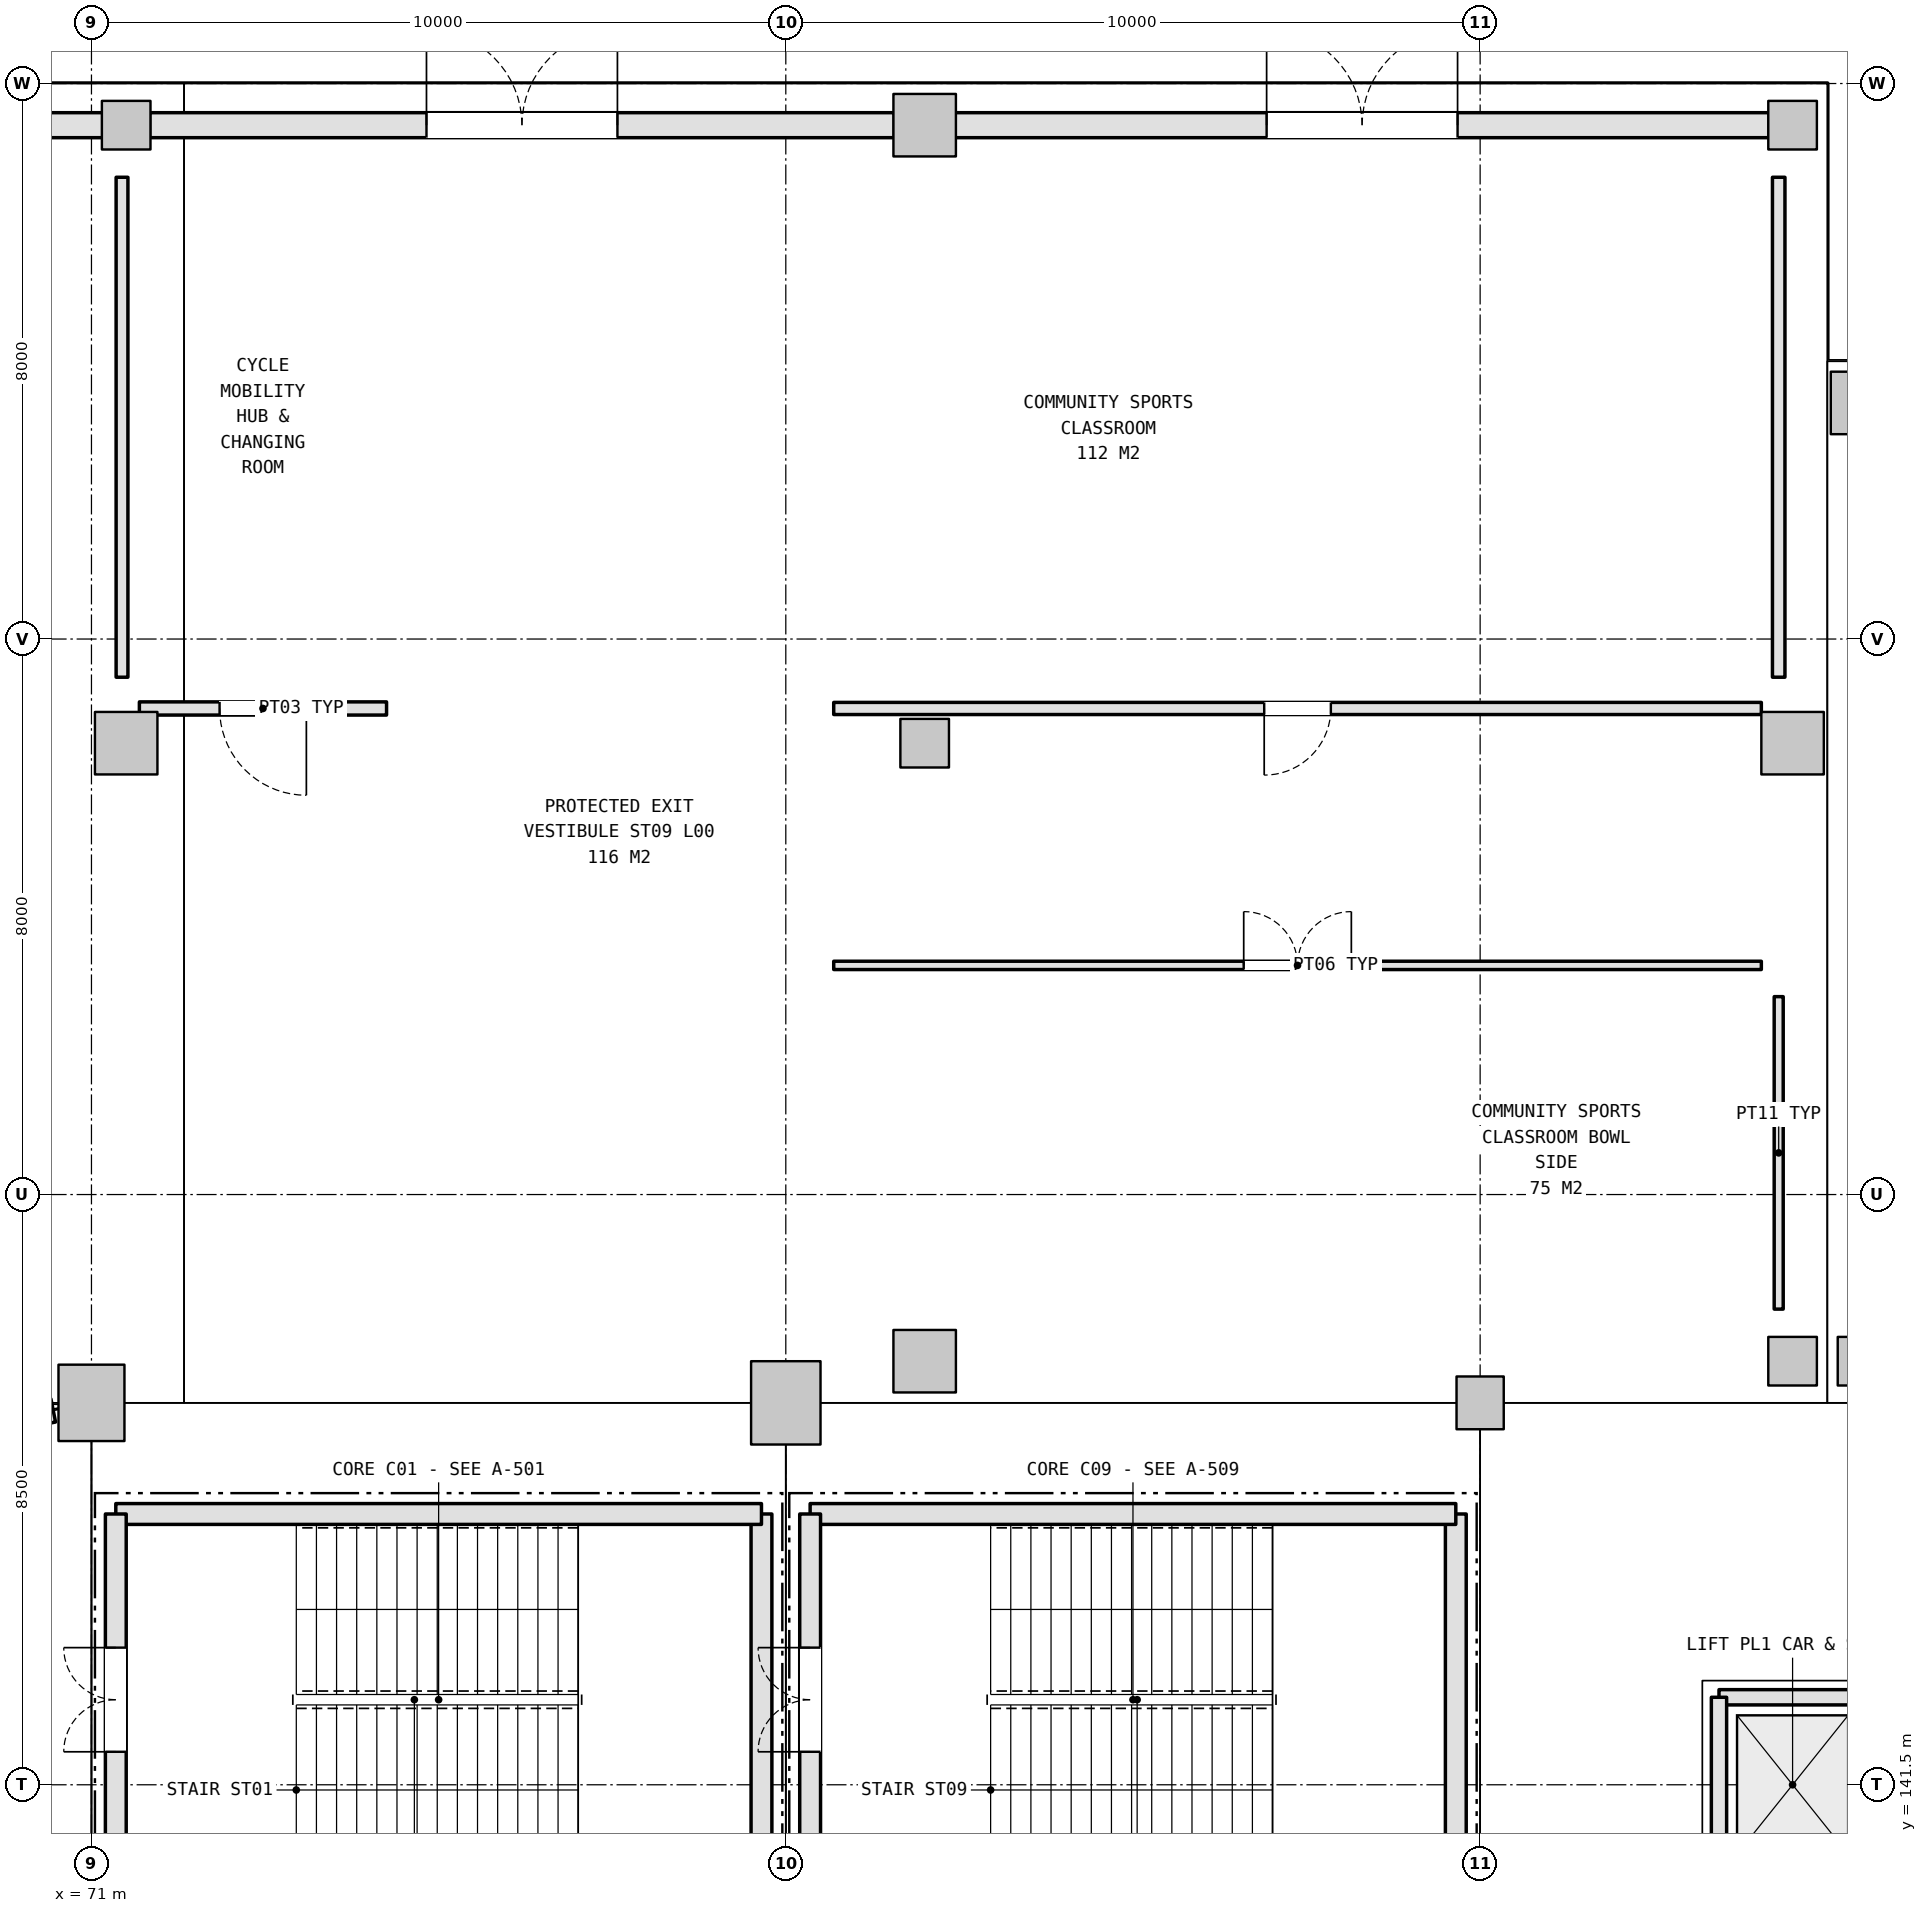
"""IFC4 building model, lengths in metres.
Left out: names, types, materials, properties, quantities, classifications, styles, units other than length and angle.
Written with IfcOpenShell. Run it as: python <this file> out.ifc"""

import sys

from ifc_helpers import new_model, si_unit, direction, frame, frame_2d, origin, origin_2d, place, context, subcontext, project, spatial, rectangle, extrude, element, fill, save


model = new_model("IFC4")
c1 = context("Model", 3, precision=1e-05, world=origin(), true_north=direction((0.0, 1.0)))
c2 = subcontext(c1, "Body", "Model", "MODEL_VIEW")
j1 = project(units=[si_unit("LENGTHUNIT", "METRE"), si_unit("PLANEANGLEUNIT", "RADIAN")], contexts=[c1])
p1 = place(None, origin())
s1 = spatial("IfcSite", under=j1, at=p1, CompositionType="ELEMENT")
p2 = place(p1, origin())
s2 = spatial("IfcBuilding", under=s1, at=p2, CompositionType="ELEMENT")
p3 = place(p2, origin())
s3 = spatial("IfcBuildingStorey", under=s2, at=p3, CompositionType="ELEMENT", Elevation=0.0)
p4 = place(p3, frame((91.0, 147.0, 0.0), z_axis=(0.0, 0.0, 1.0), x_axis=(1.0, 0.0, 0.0)))
e1 = element("IfcColumn", 1, at=p4, inside=s3, PredefinedType="COLUMN", context=c2, shape_type="SweptSolid", body=[
    extrude(rectangle(XDim=0.68, YDim=0.76, at=origin_2d()), origin(), (0.0, 0.0, 1.0), 5.4),
])
p5 = place(p3, frame((81.0, 147.0, 0.0), z_axis=(0.0, 0.0, 1.0), x_axis=(1.0, 0.0, 0.0)))
e2 = element("IfcColumn", 2, at=p5, inside=s3, PredefinedType="COLUMN", context=c2, shape_type="SweptSolid", body=[
    extrude(rectangle(XDim=1.0, YDim=1.2, at=origin_2d()), origin(), (0.0, 0.0, 1.0), 5.4),
])
p6 = place(p3, frame((71.0, 147.0, 0.0), z_axis=(0.0, 0.0, 1.0), x_axis=(1.0, 0.0, 0.0)))
e3 = element("IfcColumn", 3, at=p6, inside=s3, PredefinedType="COLUMN", context=c2, shape_type="SweptSolid", body=[
    extrude(rectangle(XDim=0.95, YDim=1.1, at=origin_2d()), origin(), (0.0, 0.0, 1.0), 5.4),
])
p7 = place(p3, frame((71.5, 156.5, 0.0), z_axis=(0.0, 0.0, 1.0), x_axis=(1.0, 0.0, 0.0)))
e4 = element("IfcColumn", 4, at=p7, inside=s3, PredefinedType="COLUMN", context=c2, shape_type="SweptSolid", body=[
    extrude(rectangle(XDim=0.9, YDim=0.9, at=origin_2d()), origin(), (0.0, 0.0, 1.0), 5.4),
])
p8 = place(p3, frame((71.5, 165.4, 0.0), z_axis=(0.0, 0.0, 1.0), x_axis=(1.0, 0.0, 0.0)))
e5 = element("IfcColumn", 5, at=p8, inside=s3, PredefinedType="COLUMN", context=c2, shape_type="SweptSolid", body=[
    extrude(rectangle(XDim=0.7, YDim=0.7, at=origin_2d()), origin(), (0.0, 0.0, 1.0), 5.4),
])
p9 = place(p3, frame((83.0, 147.6, 0.0), z_axis=(0.0, 0.0, 1.0), x_axis=(1.0, 0.0, 0.0)))
e6 = element("IfcColumn", 6, at=p9, inside=s3, PredefinedType="COLUMN", context=c2, shape_type="SweptSolid", body=[
    extrude(rectangle(XDim=0.9, YDim=0.9, at=origin_2d()), origin(), (0.0, 0.0, 1.0), 5.4),
])
p10 = place(p3, frame((83.0, 156.5, 0.0), z_axis=(0.0, 0.0, 1.0), x_axis=(1.0, 0.0, 0.0)))
e7 = element("IfcColumn", 7, at=p10, inside=s3, PredefinedType="COLUMN", context=c2, shape_type="SweptSolid", body=[
    extrude(rectangle(XDim=0.7, YDim=0.7, at=origin_2d()), origin(), (0.0, 0.0, 1.0), 5.4),
])
p11 = place(p3, frame((83.0, 165.4, 0.0), z_axis=(0.0, 0.0, 1.0), x_axis=(1.0, 0.0, 0.0)))
e8 = element("IfcColumn", 8, at=p11, inside=s3, PredefinedType="COLUMN", context=c2, shape_type="SweptSolid", body=[
    extrude(rectangle(XDim=0.9, YDim=0.9, at=origin_2d()), origin(), (0.0, 0.0, 1.0), 5.4),
])
p12 = place(p3, frame((95.5, 147.6, 0.0), z_axis=(0.0, 0.0, 1.0), x_axis=(1.0, 0.0, 0.0)))
e9 = element("IfcColumn", 9, at=p12, inside=s3, PredefinedType="COLUMN", context=c2, shape_type="SweptSolid", body=[
    extrude(rectangle(XDim=0.7, YDim=0.7, at=origin_2d()), origin(), (0.0, 0.0, 1.0), 5.4),
])
p13 = place(p3, frame((95.5, 156.5, 0.0), z_axis=(0.0, 0.0, 1.0), x_axis=(1.0, 0.0, 0.0)))
e10 = element("IfcColumn", 10, at=p13, inside=s3, PredefinedType="COLUMN", context=c2, shape_type="SweptSolid", body=[
    extrude(rectangle(XDim=0.9, YDim=0.9, at=origin_2d()), origin(), (0.0, 0.0, 1.0), 5.4),
])
for number, where, z_axis, x_axis in (
    (11, (95.5, 165.4, 0.0), (0.0, 0.0, 1.0), (1.0, 0.0, 0.0)),
    (12, (96.5, 147.6, 0.0), (0.0, 0.0, 1.0), (1.0, 0.0, 0.0)),
):
    element("IfcColumn", number, at=place(p3, frame(where, z_axis=z_axis, x_axis=x_axis)), inside=s3, PredefinedType="COLUMN", context=c2, shape_type="SweptSolid", body=[
        extrude(rectangle(XDim=0.7, YDim=0.7, at=origin_2d()), origin(), (0.0, 0.0, 1.0), 5.4),
    ])
p14 = place(p3, frame((96.5, 161.4, 0.0), z_axis=(0.0, 0.0, 1.0), x_axis=(1.0, 0.0, 0.0)))
e13 = element("IfcColumn", 13, at=p14, inside=s3, PredefinedType="COLUMN", context=c2, shape_type="SweptSolid", body=[
    extrude(rectangle(XDim=0.9, YDim=0.9, at=origin_2d()), origin(), (0.0, 0.0, 1.0), 5.4),
])
p15 = place(p3, frame((70.45, 146.89, 0.0), z_axis=(0.0, 0.0, 1.0), x_axis=(-0.980787488403, -0.195079221324, 0.0)))
e14 = element("IfcWall", 14, at=p15, inside=s3, PredefinedType="SOLIDWALL", context=c2, shape_type="SweptSolid", body=[
    extrude(rectangle(XDim=19.246, YDim=0.34, at=frame_2d((9.623, 0.0))), origin(), (0.0, 0.0, 1.0), 4.275),
])
p16 = place(p15, frame((8.823, 0.0, 2.4)))
e15 = element("IfcOpeningElement", 15, at=p16, cuts=e14, PredefinedType="OPENING", context=c2, shape_type="SweptSolid", body=[
    extrude(rectangle(XDim=1.6, YDim=1.2, at=frame_2d((0.8, 0.6))), frame((0.0, 0.18, 0.0), z_axis=(0.0, -1.0, 0.0), x_axis=(1.0, 0.0, 0.0)), (0.0, 0.0, 1.0), 0.36),
])
p17 = place(p3, frame((60.438, 165.4, 0.0), z_axis=(0.0, 0.0, 1.0), x_axis=(1.0, 0.0, 0.0)))
e16 = element("IfcWall", 16, at=p17, inside=s3, PredefinedType="SOLIDWALL", context=c2, shape_type="SweptSolid", body=[
    extrude(rectangle(XDim=10.724, YDim=0.36, at=frame_2d((5.362, 0.0))), origin(), (0.0, 0.0, 1.0), 4.475),
])
p18 = place(p17, frame((3.987, 0.0, 0.0)))
e17 = element("IfcOpeningElement", 17, at=p18, cuts=e16, PredefinedType="OPENING", context=c2, shape_type="SweptSolid", body=[
    extrude(rectangle(XDim=2.75, YDim=2.4, at=frame_2d((1.375, 1.2))), frame((0.0, 0.19, 0.0), z_axis=(0.0, -1.0, 0.0), x_axis=(1.0, 0.0, 0.0)), (0.0, 0.0, 1.0), 0.38),
])
p19 = place(p3, frame((71.838, 165.4, 0.0), z_axis=(0.0, 0.0, 1.0), x_axis=(1.0, 0.0, 0.0)))
e18 = element("IfcWall", 18, at=p19, inside=s3, PredefinedType="SOLIDWALL", context=c2, shape_type="SweptSolid", body=[
    extrude(rectangle(XDim=10.724, YDim=0.36, at=frame_2d((5.362, 0.0))), origin(), (0.0, 0.0, 1.0), 4.475),
])
p20 = place(p19, frame((3.987, 0.0, 0.0)))
e19 = element("IfcOpeningElement", 19, at=p20, cuts=e18, PredefinedType="OPENING", context=c2, shape_type="SweptSolid", body=[
    extrude(rectangle(XDim=2.75, YDim=2.4, at=frame_2d((1.375, 1.2))), frame((0.0, 0.19, 0.0), z_axis=(0.0, -1.0, 0.0), x_axis=(1.0, 0.0, 0.0)), (0.0, 0.0, 1.0), 0.38),
])
p21 = place(p3, frame((83.438, 165.4, 0.0), z_axis=(0.0, 0.0, 1.0), x_axis=(1.0, 0.0, 0.0)))
e20 = element("IfcWall", 20, at=p21, inside=s3, PredefinedType="SOLIDWALL", context=c2, shape_type="SweptSolid", body=[
    extrude(rectangle(XDim=11.724, YDim=0.36, at=frame_2d((5.862, 0.0))), origin(), (0.0, 0.0, 1.0), 4.475),
])
p22 = place(p21, frame((4.487, 0.0, 0.0)))
e21 = element("IfcOpeningElement", 21, at=p22, cuts=e20, PredefinedType="OPENING", context=c2, shape_type="SweptSolid", body=[
    extrude(rectangle(XDim=2.75, YDim=2.4, at=frame_2d((1.375, 1.2))), frame((0.0, 0.19, 0.0), z_axis=(0.0, -1.0, 0.0), x_axis=(1.0, 0.0, 0.0)), (0.0, 0.0, 1.0), 0.38),
])
p23 = place(p3, frame((80.65, 140.05, 0.0), z_axis=(0.0, 0.0, 1.0), x_axis=(0.0, 1.0, 0.0)))
e22 = element("IfcWall", 22, at=p23, inside=s3, PredefinedType="SHEAR", context=c2, shape_type="SweptSolid", body=[
    extrude(rectangle(XDim=5.349, YDim=0.3, at=frame_2d((2.675, 0.0))), origin(), (0.0, 0.0, 1.0), 5.14),
])
p24 = place(p3, frame((80.65, 145.4, 0.0), z_axis=(0.0, 0.0, 1.0), x_axis=(-1.0, 0.0, 0.0)))
e23 = element("IfcWall", 23, at=p24, inside=s3, PredefinedType="SHEAR", context=c2, shape_type="SweptSolid", body=[
    extrude(rectangle(XDim=9.299, YDim=0.3, at=frame_2d((4.65, 0.0))), origin(), (0.0, 0.0, 1.0), 5.14),
])
p25 = place(p3, frame((71.35, 145.4, 0.0), z_axis=(0.0, 0.0, 1.0), x_axis=(0.0, -1.0, 0.0)))
e24 = element("IfcWall", 24, at=p25, inside=s3, PredefinedType="SHEAR", context=c2, shape_type="SweptSolid", body=[
    extrude(rectangle(XDim=5.349, YDim=0.3, at=frame_2d((2.675, 0.0))), origin(), (0.0, 0.0, 1.0), 5.14),
])
p26 = place(p25, frame((1.925, 0.0, 0.0)))
e25 = element("IfcOpeningElement", 25, at=p26, cuts=e24, PredefinedType="OPENING", context=c2, shape_type="SweptSolid", body=[
    extrude(rectangle(XDim=1.5, YDim=2.2, at=frame_2d((0.75, 1.1))), frame((0.0, 0.16, 0.0), z_axis=(0.0, -1.0, 0.0), x_axis=(1.0, 0.0, 0.0)), (0.0, 0.0, 1.0), 0.32),
])
p27 = place(p3, frame((90.65, 140.05, 0.0), z_axis=(0.0, 0.0, 1.0), x_axis=(0.0, 1.0, 0.0)))
e26 = element("IfcWall", 26, at=p27, inside=s3, PredefinedType="SHEAR", context=c2, shape_type="SweptSolid", body=[
    extrude(rectangle(XDim=5.349, YDim=0.3, at=frame_2d((2.675, 0.0))), origin(), (0.0, 0.0, 1.0), 5.14),
])
p28 = place(p3, frame((90.65, 145.4, 0.0), z_axis=(0.0, 0.0, 1.0), x_axis=(-1.0, 0.0, 0.0)))
e27 = element("IfcWall", 27, at=p28, inside=s3, PredefinedType="SHEAR", context=c2, shape_type="SweptSolid", body=[
    extrude(rectangle(XDim=9.299, YDim=0.3, at=frame_2d((4.65, 0.0))), origin(), (0.0, 0.0, 1.0), 5.14),
])
p29 = place(p3, frame((81.35, 145.4, 0.0), z_axis=(0.0, 0.0, 1.0), x_axis=(0.0, -1.0, 0.0)))
e28 = element("IfcWall", 28, at=p29, inside=s3, PredefinedType="SHEAR", context=c2, shape_type="SweptSolid", body=[
    extrude(rectangle(XDim=5.349, YDim=0.3, at=frame_2d((2.675, 0.0))), origin(), (0.0, 0.0, 1.0), 5.14),
])
p30 = place(p29, frame((1.925, 0.0, 0.0)))
e29 = element("IfcOpeningElement", 29, at=p30, cuts=e28, PredefinedType="OPENING", context=c2, shape_type="SweptSolid", body=[
    extrude(rectangle(XDim=1.5, YDim=2.2, at=frame_2d((0.75, 1.1))), frame((0.0, 0.16, 0.0), z_axis=(0.0, -1.0, 0.0), x_axis=(1.0, 0.0, 0.0)), (0.0, 0.0, 1.0), 0.32),
])
p31 = place(p3, frame((96.56, 142.76, -1.1), z_axis=(0.0, 0.0, 1.0), x_axis=(-1.0, 0.0, 0.0)))
e30 = element("IfcWall", 30, at=p31, inside=s3, PredefinedType="SHEAR", context=c2, shape_type="SweptSolid", body=[
    extrude(rectangle(XDim=2.12, YDim=0.22, at=frame_2d((1.06, 0.0))), origin(), (0.0, 0.0, 1.0), 6.24),
])
p32 = place(p3, frame((94.44, 142.76, -1.1), z_axis=(0.0, 0.0, 1.0), x_axis=(0.0, -1.0, 0.0)))
e31 = element("IfcWall", 31, at=p32, inside=s3, PredefinedType="SHEAR", context=c2, shape_type="SweptSolid", body=[
    extrude(rectangle(XDim=2.52, YDim=0.22, at=frame_2d((1.26, 0.0))), origin(), (0.0, 0.0, 1.0), 6.24),
])
p33 = place(p3, frame((75.25, 157.0, 0.0), z_axis=(0.0, 0.0, 1.0), x_axis=(-1.0, 0.0, 0.0)))
e32 = element("IfcWall", 32, at=p33, inside=s3, PredefinedType="PARTITIONING", context=c2, shape_type="SweptSolid", body=[
    extrude(rectangle(XDim=3.56, YDim=0.19, at=frame_2d((1.78, 0.0))), origin(), (0.0, 0.0, 1.0), 4.525),
])
p34 = place(p33, frame((1.155, 0.0, 0.0)))
e33 = element("IfcOpeningElement", 33, at=p34, cuts=e32, PredefinedType="OPENING", context=c2, shape_type="SweptSolid", body=[
    extrude(rectangle(XDim=1.25, YDim=2.2, at=frame_2d((0.625, 1.1))), frame((0.0, 0.105, 0.0), z_axis=(0.0, -1.0, 0.0), x_axis=(1.0, 0.0, 0.0)), (0.0, 0.0, 1.0), 0.21),
])
p35 = place(p3, frame((71.44, 157.45, 0.0), z_axis=(0.0, 0.0, 1.0), x_axis=(0.0, 1.0, 0.0)))
e34 = element("IfcWall", 34, at=p35, inside=s3, PredefinedType="PARTITIONING", context=c2, shape_type="SweptSolid", body=[
    extrude(rectangle(XDim=7.2, YDim=0.17, at=frame_2d((3.6, 0.0))), origin(), (0.0, 0.0, 1.0), 4.525),
])
p36 = place(p3, frame((81.69, 153.3, 0.0), z_axis=(0.0, 0.0, 1.0), x_axis=(1.0, 0.0, 0.0)))
e35 = element("IfcWall", 35, at=p36, inside=s3, PredefinedType="PARTITIONING", context=c2, shape_type="SweptSolid", body=[
    extrude(rectangle(XDim=13.36, YDim=0.12, at=frame_2d((6.68, 0.0))), origin(), (0.0, 0.0, 1.0), 4.525),
])
p37 = place(p36, frame((5.905, 0.0, 0.0)))
e36 = element("IfcOpeningElement", 36, at=p37, cuts=e35, PredefinedType="OPENING", context=c2, shape_type="SweptSolid", body=[
    extrude(rectangle(XDim=1.55, YDim=2.15, at=frame_2d((0.775, 1.075))), frame((0.0, 0.07, 0.0), z_axis=(0.0, -1.0, 0.0), x_axis=(1.0, 0.0, 0.0)), (0.0, 0.0, 1.0), 0.14),
])
p38 = place(p3, frame((95.3, 152.85, 0.0), z_axis=(0.0, 0.0, 1.0), x_axis=(0.0, -1.0, 0.0)))
e37 = element("IfcWall", 37, at=p38, inside=s3, PredefinedType="PARTITIONING", context=c2, shape_type="SweptSolid", body=[
    extrude(rectangle(XDim=4.5, YDim=0.13, at=frame_2d((2.25, 0.0))), origin(), (0.0, 0.0, 1.0), 4.475),
])
p39 = place(p3, frame((95.05, 157.0, 0.0), z_axis=(0.0, 0.0, 1.0), x_axis=(-1.0, 0.0, 0.0)))
e38 = element("IfcWall", 38, at=p39, inside=s3, PredefinedType="PARTITIONING", context=c2, shape_type="SweptSolid", body=[
    extrude(rectangle(XDim=13.36, YDim=0.175, at=frame_2d((6.68, 0.0))), origin(), (0.0, 0.0, 1.0), 4.525),
])
p40 = place(p39, frame((6.2, 0.0, 0.0)))
e39 = element("IfcOpeningElement", 39, at=p40, cuts=e38, PredefinedType="OPENING", context=c2, shape_type="SweptSolid", body=[
    extrude(rectangle(XDim=0.96, YDim=2.15, at=frame_2d((0.48, 1.075))), frame((0.0, 0.097, 0.0), z_axis=(0.0, -1.0, 0.0), x_axis=(1.0, 0.0, 0.0)), (0.0, 0.0, 1.0), 0.195),
])
p41 = place(p3, frame((95.3, 164.65, 0.0), z_axis=(0.0, 0.0, 1.0), x_axis=(0.0, -1.0, 0.0)))
e40 = element("IfcWall", 40, at=p41, inside=s3, PredefinedType="PARTITIONING", context=c2, shape_type="SweptSolid", body=[
    extrude(rectangle(XDim=7.2, YDim=0.18, at=frame_2d((3.6, 0.0))), origin(), (0.0, 0.0, 1.0), 4.475),
])
p42 = place(p20, origin())
e41 = element("IfcDoor", 41, at=p42, inside=s3, OperationType="DOUBLE_DOOR_SINGLE_SWING", PredefinedType="DOOR", context=c2, shape_type="SweptSolid", body=[
    extrude(rectangle(XDim=2.75, YDim=2.4, at=frame_2d((1.375, 1.2))), frame((0.0, 0.025, 0.0), z_axis=(0.0, -1.0, 0.0), x_axis=(1.0, 0.0, 0.0)), (0.0, 0.0, 1.0), 0.05),
])
fill(e19, e41)
p43 = place(p22, origin())
e42 = element("IfcDoor", 42, at=p43, inside=s3, OperationType="DOUBLE_DOOR_SINGLE_SWING", PredefinedType="DOOR", context=c2, shape_type="SweptSolid", body=[
    extrude(rectangle(XDim=2.75, YDim=2.4, at=frame_2d((1.375, 1.2))), frame((0.0, 0.025, 0.0), z_axis=(0.0, -1.0, 0.0), x_axis=(1.0, 0.0, 0.0)), (0.0, 0.0, 1.0), 0.05),
])
fill(e21, e42)
p44 = place(p26, frame((1.5, 0.0, 0.0), z_axis=(0.0, 0.0, 1.0), x_axis=(-1.0, 0.0, 0.0)))
e43 = element("IfcDoor", 43, at=p44, inside=s3, OperationType="DOUBLE_DOOR_SINGLE_SWING", PredefinedType="DOOR", context=c2, shape_type="SweptSolid", body=[
    extrude(rectangle(XDim=1.5, YDim=2.2, at=frame_2d((0.75, 1.1))), frame((0.0, 0.025, 0.0), z_axis=(0.0, -1.0, 0.0), x_axis=(1.0, 0.0, 0.0)), (0.0, 0.0, 1.0), 0.05),
])
fill(e25, e43)
p45 = place(p30, frame((1.5, 0.0, 0.0), z_axis=(0.0, 0.0, 1.0), x_axis=(-1.0, 0.0, 0.0)))
e44 = element("IfcDoor", 44, at=p45, inside=s3, OperationType="DOUBLE_DOOR_SINGLE_SWING", PredefinedType="DOOR", context=c2, shape_type="SweptSolid", body=[
    extrude(rectangle(XDim=1.5, YDim=2.2, at=frame_2d((0.75, 1.1))), frame((0.0, 0.025, 0.0), z_axis=(0.0, -1.0, 0.0), x_axis=(1.0, 0.0, 0.0)), (0.0, 0.0, 1.0), 0.05),
])
fill(e29, e44)
p46 = place(p34, origin())
e45 = element("IfcDoor", 45, at=p46, inside=s3, OperationType="SINGLE_SWING_LEFT", PredefinedType="DOOR", context=c2, shape_type="SweptSolid", body=[
    extrude(rectangle(XDim=1.25, YDim=2.2, at=frame_2d((0.625, 1.1))), frame((0.0, 0.025, 0.0), z_axis=(0.0, -1.0, 0.0), x_axis=(1.0, 0.0, 0.0)), (0.0, 0.0, 1.0), 0.05),
])
fill(e33, e45)
p47 = place(p37, origin())
e46 = element("IfcDoor", 46, at=p47, inside=s3, OperationType="DOUBLE_DOOR_SINGLE_SWING", PredefinedType="DOOR", context=c2, shape_type="SweptSolid", body=[
    extrude(rectangle(XDim=1.55, YDim=2.15, at=frame_2d((0.775, 1.075))), frame((0.0, 0.025, 0.0), z_axis=(0.0, -1.0, 0.0), x_axis=(1.0, 0.0, 0.0)), (0.0, 0.0, 1.0), 0.05),
])
fill(e36, e46)
p48 = place(p40, origin())
e47 = element("IfcDoor", 47, at=p48, inside=s3, OperationType="SINGLE_SWING_RIGHT", PredefinedType="DOOR", context=c2, shape_type="SweptSolid", body=[
    extrude(rectangle(XDim=0.96, YDim=2.15, at=frame_2d((0.48, 1.075))), frame((0.0, 0.025, 0.0), z_axis=(0.0, -1.0, 0.0), x_axis=(1.0, 0.0, 0.0)), (0.0, 0.0, 1.0), 0.05),
])
fill(e39, e47)
save(model, sys.argv[1])
